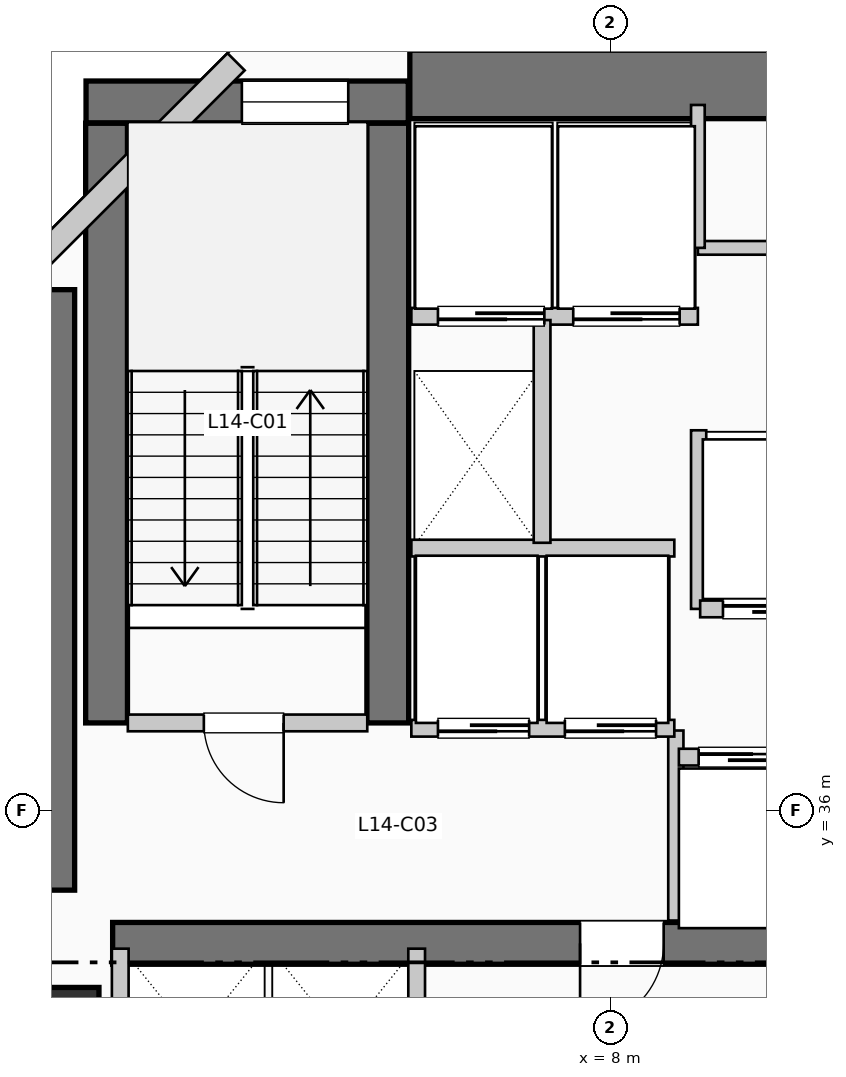
"""IFC4 building model, lengths in metres.
Left out: names, types, materials, properties, quantities, classifications, styles, units other than length and angle.
Written with IfcOpenShell. Run it as: python <this file> out.ifc"""

import sys

from ifc_helpers import new_model, si_unit, direction, frame, frame_2d, origin, origin_2d, place, context, subcontext, project, spatial, rectangle, extrude, element, fill, save


model = new_model("IFC4")
c1 = context("Model", 3, precision=1e-05, world=origin(), true_north=direction((0.0, 1.0)))
c2 = subcontext(c1, "Body", "Model", "MODEL_VIEW")
j1 = project(units=[si_unit("LENGTHUNIT", "METRE"), si_unit("PLANEANGLEUNIT", "RADIAN")], contexts=[c1])
p1 = place(None, origin())
s1 = spatial("IfcSite", under=j1, at=p1, CompositionType="ELEMENT")
p2 = place(p1, origin())
s2 = spatial("IfcBuilding", under=s1, at=p2, CompositionType="ELEMENT")
p3 = place(p2, frame((0.0, 0.0, 62.04)))
s3 = spatial("IfcBuildingStorey", under=s2, at=p3, CompositionType="ELEMENT", Elevation=62.04)
p4 = place(p3, frame((5.36, 45.55, 0.0), z_axis=(0.0, 0.0, 1.0), x_axis=(1.0, 0.0, 0.0)))
e1 = element("IfcWall", 1, at=p4, inside=s3, PredefinedType="SHEAR", context=c2, shape_type="SweptSolid", body=[
    extrude(rectangle(XDim=13.98, YDim=0.9, at=frame_2d((6.99, 0.0))), origin(), (0.0, 0.0, 1.0), 3.96),
])
p5 = place(p3, frame((0.5, 34.95, 0.0), z_axis=(0.0, 0.0, 1.0), x_axis=(0.0, 1.0, 0.0)))
e2 = element("IfcWall", 2, at=p5, inside=s3, PredefinedType="SHEAR", context=c2, shape_type="SweptSolid", body=[
    extrude(rectangle(XDim=7.9, YDim=0.9, at=frame_2d((3.95, 0.0))), origin(), (0.0, 0.0, 1.0), 3.96),
])
p6 = place(p3, frame((1.45, 34.25, 0.0), z_axis=(0.0, 0.0, 1.0), x_axis=(1.0, 0.0, 0.0)))
e3 = element("IfcWall", 3, at=p6, inside=s3, PredefinedType="SHEAR", context=c2, shape_type="SweptSolid", body=[
    extrude(rectangle(XDim=10.71, YDim=0.55, at=frame_2d((5.355, 0.0))), origin(), (0.0, 0.0, 1.0), 3.96),
])
p7 = place(p6, frame((7.25, 0.0, 0.0), z_axis=(0.0, 0.0, 1.0), x_axis=(-1.0, 0.0, 0.0)))
e4 = element("IfcOpeningElement", 4, at=p7, cuts=e3, PredefinedType="OPENING", context=c2, shape_type="SweptSolid", body=[
    extrude(rectangle(XDim=1.1, YDim=2.15, at=frame_2d((0.55, 1.075))), frame((0.0, 0.285, 0.0), z_axis=(0.0, -1.0, 0.0), x_axis=(1.0, 0.0, 0.0)), (0.0, 0.0, 1.0), 0.57),
])
for number, where, z_axis, x_axis in (
    (5, (1.37, 37.15, 0.0), (0.0, 0.0, 1.0), (0.0, 1.0, 0.0)),
    (6, (5.07, 37.15, 0.0), (0.0, 0.0, 1.0), (0.0, 1.0, 0.0)),
):
    element("IfcWall", number, at=place(p3, frame(where, z_axis=z_axis, x_axis=x_axis)), inside=s3, PredefinedType="SHEAR", context=c2, shape_type="SweptSolid", body=[
        extrude(rectangle(XDim=7.89, YDim=0.55, at=frame_2d((3.945, 0.0))), origin(), (0.0, 0.0, 1.0), 3.96),
    ])
p8 = place(p3, frame((1.1, 45.32, 0.0), z_axis=(0.0, 0.0, 1.0), x_axis=(1.0, 0.0, 0.0)))
e7 = element("IfcWall", 7, at=p8, inside=s3, PredefinedType="SHEAR", context=c2, shape_type="SweptSolid", body=[
    extrude(rectangle(XDim=4.24, YDim=0.55, at=frame_2d((2.12, 0.0))), origin(), (0.0, 0.0, 1.0), 3.96),
])
p9 = place(p8, frame((2.05, 0.0, 1.05)))
e8 = element("IfcOpeningElement", 8, at=p9, cuts=e7, PredefinedType="OPENING", context=c2, shape_type="SweptSolid", body=[
    extrude(rectangle(XDim=1.4, YDim=1.8, at=frame_2d((0.7, 0.9))), frame((0.0, 0.285, 0.0), z_axis=(0.0, -1.0, 0.0), x_axis=(1.0, 0.0, 0.0)), (0.0, 0.0, 1.0), 0.57),
])
p10 = place(p3, frame((0.8, 33.2, 0.0), z_axis=(0.0, 0.0, 1.0), x_axis=(1.0, 0.0, 0.0)))
e9 = element("IfcColumn", 9, at=p10, inside=s3, PredefinedType="COLUMN", context=c2, shape_type="SweptSolid", body=[
    extrude(rectangle(XDim=0.94, YDim=0.94, at=origin_2d()), origin(), (0.0, 0.0, 1.0), 3.96),
])
p11 = place(p3, frame((3.074, 45.848, 0.0), z_axis=(0.0, 0.0, 1.0), x_axis=(-0.707106781187, -0.707106781187, 0.0)))
e10 = element("IfcWall", 10, at=p11, inside=s3, PredefinedType="SOLIDWALL", context=c2, shape_type="SweptSolid", body=[
    extrude(rectangle(XDim=4.133, YDim=0.32, at=frame_2d((2.066, 0.0))), origin(), (0.0, 0.0, 1.0), 3.71),
])
p12 = place(p3, frame((1.65, 37.15, 0.0), z_axis=(0.0, 0.0, 1.0), x_axis=(1.0, 0.0, 0.0)))
e11 = element("IfcWall", 11, at=p12, inside=s3, PredefinedType="PARTITIONING", context=c2, shape_type="SweptSolid", body=[
    extrude(rectangle(XDim=3.15, YDim=0.22, at=frame_2d((1.575, 0.0))), origin(), (0.0, 0.0, 1.0), 3.71),
])
p13 = place(p12, frame((2.05, 0.0, 0.0), z_axis=(0.0, 0.0, 1.0), x_axis=(-1.0, 0.0, 0.0)))
e12 = element("IfcOpeningElement", 12, at=p13, cuts=e11, PredefinedType="OPENING", context=c2, shape_type="SweptSolid", body=[
    extrude(rectangle(XDim=1.05, YDim=2.15, at=frame_2d((0.525, 1.075))), frame((0.0, 0.12, 0.0), z_axis=(0.0, -1.0, 0.0), x_axis=(1.0, 0.0, 0.0)), (0.0, 0.0, 1.0), 0.24),
])
p14 = place(p3, frame((8.86, 34.55, 0.0), z_axis=(0.0, 0.0, 1.0), x_axis=(0.0, 1.0, 0.0)))
e13 = element("IfcWall", 13, at=p14, inside=s3, PredefinedType="PARTITIONING", context=c2, shape_type="SweptSolid", body=[
    extrude(rectangle(XDim=2.5, YDim=0.2, at=frame_2d((1.25, 0.0))), origin(), (0.0, 0.0, 1.0), 3.71),
])
p15 = place(p3, frame((5.38, 37.08, 0.0), z_axis=(0.0, 0.0, 1.0), x_axis=(1.0, 0.0, 0.0)))
e14 = element("IfcWall", 14, at=p15, inside=s3, PredefinedType="PARTITIONING", context=c2, shape_type="SweptSolid", body=[
    extrude(rectangle(XDim=3.46, YDim=0.22, at=frame_2d((1.73, 0.0))), origin(), (0.0, 0.0, 1.0), 3.71),
])
p16 = place(p15, frame((1.55, 0.0, 0.0), z_axis=(0.0, 0.0, 1.0), x_axis=(-1.0, 0.0, 0.0)))
e15 = element("IfcOpeningElement", 15, at=p16, cuts=e14, PredefinedType="OPENING", context=c2, shape_type="SweptSolid", body=[
    extrude(rectangle(XDim=1.2, YDim=2.2, at=frame_2d((0.6, 1.1))), frame((0.0, 0.12, 0.0), z_axis=(0.0, -1.0, 0.0), x_axis=(1.0, 0.0, 0.0)), (0.0, 0.0, 1.0), 0.24),
])
p17 = place(p15, frame((3.22, 0.0, 0.0), z_axis=(0.0, 0.0, 1.0), x_axis=(-1.0, 0.0, 0.0)))
e16 = element("IfcOpeningElement", 16, at=p17, cuts=e14, PredefinedType="OPENING", context=c2, shape_type="SweptSolid", body=[
    extrude(rectangle(XDim=1.2, YDim=2.2, at=frame_2d((0.6, 1.1))), frame((0.0, 0.12, 0.0), z_axis=(0.0, -1.0, 0.0), x_axis=(1.0, 0.0, 0.0)), (0.0, 0.0, 1.0), 0.24),
])
p18 = place(p3, frame((5.38, 39.45, 0.0), z_axis=(0.0, 0.0, 1.0), x_axis=(1.0, 0.0, 0.0)))
e17 = element("IfcWall", 17, at=p18, inside=s3, PredefinedType="PARTITIONING", context=c2, shape_type="SweptSolid", body=[
    extrude(rectangle(XDim=3.46, YDim=0.22, at=frame_2d((1.73, 0.0))), origin(), (0.0, 0.0, 1.0), 3.71),
])
p19 = place(p3, frame((5.38, 42.5, 0.0), z_axis=(0.0, 0.0, 1.0), x_axis=(1.0, 0.0, 0.0)))
e18 = element("IfcWall", 18, at=p19, inside=s3, PredefinedType="PARTITIONING", context=c2, shape_type="SweptSolid", body=[
    extrude(rectangle(XDim=3.77, YDim=0.22, at=frame_2d((1.885, 0.0))), origin(), (0.0, 0.0, 1.0), 3.71),
])
p20 = place(p19, frame((1.75, 0.0, 0.0), z_axis=(0.0, 0.0, 1.0), x_axis=(-1.0, 0.0, 0.0)))
e19 = element("IfcOpeningElement", 19, at=p20, cuts=e18, PredefinedType="OPENING", context=c2, shape_type="SweptSolid", body=[
    extrude(rectangle(XDim=1.4, YDim=2.2, at=frame_2d((0.7, 1.1))), frame((0.0, 0.12, 0.0), z_axis=(0.0, -1.0, 0.0), x_axis=(1.0, 0.0, 0.0)), (0.0, 0.0, 1.0), 0.24),
])
p21 = place(p19, frame((3.53, 0.0, 0.0), z_axis=(0.0, 0.0, 1.0), x_axis=(-1.0, 0.0, 0.0)))
e20 = element("IfcOpeningElement", 20, at=p21, cuts=e18, PredefinedType="OPENING", context=c2, shape_type="SweptSolid", body=[
    extrude(rectangle(XDim=1.4, YDim=2.2, at=frame_2d((0.7, 1.1))), frame((0.0, 0.12, 0.0), z_axis=(0.0, -1.0, 0.0), x_axis=(1.0, 0.0, 0.0)), (0.0, 0.0, 1.0), 0.24),
])
p22 = place(p3, frame((7.1, 39.52, 0.0), z_axis=(0.0, 0.0, 1.0), x_axis=(0.0, 1.0, 0.0)))
e21 = element("IfcWall", 21, at=p22, inside=s3, PredefinedType="PARTITIONING", context=c2, shape_type="SweptSolid", body=[
    extrude(rectangle(XDim=2.93, YDim=0.22, at=frame_2d((1.465, 0.0))), origin(), (0.0, 0.0, 1.0), 3.71),
])
for number, where, z_axis, x_axis in (
    (22, (1.55, 31.8, 0.0), (0.0, 0.0, 1.0), (0.0, 1.0, 0.0)),
    (23, (5.45, 31.8, 0.0), (0.0, 0.0, 1.0), (0.0, 1.0, 0.0)),
):
    element("IfcWall", number, at=place(p3, frame(where, z_axis=z_axis, x_axis=x_axis)), inside=s3, PredefinedType="PARTITIONING", context=c2, shape_type="SweptSolid", body=[
        extrude(rectangle(XDim=2.38, YDim=0.22, at=frame_2d((1.19, 0.0))), origin(), (0.0, 0.0, 1.0), 3.71),
    ])
p23 = place(p3, frame((9.16, 38.65, 0.0), z_axis=(0.0, 0.0, 1.0), x_axis=(0.0, 1.0, 0.0)))
e24 = element("IfcWall", 24, at=p23, inside=s3, PredefinedType="PARTITIONING", context=c2, shape_type="SweptSolid", body=[
    extrude(rectangle(XDim=2.35, YDim=0.2, at=frame_2d((1.175, 0.0))), origin(), (0.0, 0.0, 1.0), 3.71),
])
p24 = place(p3, frame((8.9, 36.7, 0.0), z_axis=(0.0, 0.0, 1.0), x_axis=(1.0, 0.0, 0.0)))
e25 = element("IfcWall", 25, at=p24, inside=s3, PredefinedType="PARTITIONING", context=c2, shape_type="SweptSolid", body=[
    extrude(rectangle(XDim=3.26, YDim=0.22, at=frame_2d((1.63, 0.0))), origin(), (0.0, 0.0, 1.0), 3.71),
])
p25 = place(p24, frame((0.26, 0.0, 0.0)))
e26 = element("IfcOpeningElement", 26, at=p25, cuts=e25, PredefinedType="OPENING", context=c2, shape_type="SweptSolid", body=[
    extrude(rectangle(XDim=1.1, YDim=2.2, at=frame_2d((0.55, 1.1))), frame((0.0, 0.12, 0.0), z_axis=(0.0, -1.0, 0.0), x_axis=(1.0, 0.0, 0.0)), (0.0, 0.0, 1.0), 0.24),
])
p26 = place(p24, frame((1.88, 0.0, 0.0)))
e27 = element("IfcOpeningElement", 27, at=p26, cuts=e25, PredefinedType="OPENING", context=c2, shape_type="SweptSolid", body=[
    extrude(rectangle(XDim=1.1, YDim=2.2, at=frame_2d((0.55, 1.1))), frame((0.0, 0.12, 0.0), z_axis=(0.0, -1.0, 0.0), x_axis=(1.0, 0.0, 0.0)), (0.0, 0.0, 1.0), 0.24),
])
p27 = place(p3, frame((9.18, 38.65, 0.0), z_axis=(0.0, 0.0, 1.0), x_axis=(1.0, 0.0, 0.0)))
e28 = element("IfcWall", 28, at=p27, inside=s3, PredefinedType="PARTITIONING", context=c2, shape_type="SweptSolid", body=[
    extrude(rectangle(XDim=3.38, YDim=0.22, at=frame_2d((1.69, 0.0))), origin(), (0.0, 0.0, 1.0), 3.71),
])
p28 = place(p27, frame((0.3, 0.0, 0.0)))
e29 = element("IfcOpeningElement", 29, at=p28, cuts=e28, PredefinedType="OPENING", context=c2, shape_type="SweptSolid", body=[
    extrude(rectangle(XDim=1.1, YDim=2.2, at=frame_2d((0.55, 1.1))), frame((0.0, 0.12, 0.0), z_axis=(0.0, -1.0, 0.0), x_axis=(1.0, 0.0, 0.0)), (0.0, 0.0, 1.0), 0.24),
])
p29 = place(p27, frame((1.95, 0.0, 0.0)))
e30 = element("IfcOpeningElement", 30, at=p29, cuts=e28, PredefinedType="OPENING", context=c2, shape_type="SweptSolid", body=[
    extrude(rectangle(XDim=1.1, YDim=2.2, at=frame_2d((0.55, 1.1))), frame((0.0, 0.12, 0.0), z_axis=(0.0, -1.0, 0.0), x_axis=(1.0, 0.0, 0.0)), (0.0, 0.0, 1.0), 0.24),
])
p30 = place(p3, frame((9.15, 43.4, 0.0), z_axis=(0.0, 0.0, 1.0), x_axis=(1.0, 0.0, 0.0)))
e31 = element("IfcWall", 31, at=p30, inside=s3, PredefinedType="PLUMBINGWALL", context=c2, shape_type="SweptSolid", body=[
    extrude(rectangle(XDim=9.33, YDim=0.18, at=frame_2d((4.665, 0.0))), origin(), (0.0, 0.0, 1.0), 3.71),
])
p31 = place(p30, frame((1.88, 0.0, 0.0)))
e32 = element("IfcOpeningElement", 32, at=p31, cuts=e31, PredefinedType="OPENING", context=c2, shape_type="SweptSolid", body=[
    extrude(rectangle(XDim=0.92, YDim=2.1, at=frame_2d((0.46, 1.05))), frame((0.0, 0.1, 0.0), z_axis=(0.0, -1.0, 0.0), x_axis=(1.0, 0.0, 0.0)), (0.0, 0.0, 1.0), 0.2),
])
p32 = place(p30, frame((6.515, 0.0, 0.0)))
e33 = element("IfcOpeningElement", 33, at=p32, cuts=e31, PredefinedType="OPENING", context=c2, shape_type="SweptSolid", body=[
    extrude(rectangle(XDim=0.92, YDim=2.1, at=frame_2d((0.46, 1.05))), frame((0.0, 0.1, 0.0), z_axis=(0.0, -1.0, 0.0), x_axis=(1.0, 0.0, 0.0)), (0.0, 0.0, 1.0), 0.2),
])
p33 = place(p3, frame((9.15, 43.4, 0.0), z_axis=(0.0, 0.0, 1.0), x_axis=(0.0, 1.0, 0.0)))
e34 = element("IfcWall", 34, at=p33, inside=s3, PredefinedType="PLUMBINGWALL", context=c2, shape_type="SweptSolid", body=[
    extrude(rectangle(XDim=1.88, YDim=0.18, at=frame_2d((0.94, 0.0))), origin(), (0.0, 0.0, 1.0), 3.71),
])
p34 = place(p9, origin())
e35 = element("IfcWindow", 35, at=p34, inside=s3, PartitioningType="SINGLE_PANEL", PredefinedType="WINDOW", context=c2, shape_type="SweptSolid", body=[
    extrude(rectangle(XDim=1.4, YDim=1.8, at=frame_2d((0.7, 0.9))), frame((0.0, 0.03, 0.0), z_axis=(0.0, -1.0, 0.0), x_axis=(1.0, 0.0, 0.0)), (0.0, 0.0, 1.0), 0.06),
])
fill(e8, e35)
p35 = place(p13, origin())
e36 = element("IfcDoor", 36, at=p35, inside=s3, OperationType="SINGLE_SWING_RIGHT", PredefinedType="DOOR", context=c2, shape_type="SweptSolid", body=[
    extrude(rectangle(XDim=1.05, YDim=2.15, at=frame_2d((0.525, 1.075))), frame((0.0, 0.025, 0.0), z_axis=(0.0, -1.0, 0.0), x_axis=(1.0, 0.0, 0.0)), (0.0, 0.0, 1.0), 0.05),
])
fill(e12, e36)
p36 = place(p7, origin())
e37 = element("IfcDoor", 37, at=p36, inside=s3, OperationType="SINGLE_SWING_LEFT", PredefinedType="DOOR", context=c2, shape_type="SweptSolid", body=[
    extrude(rectangle(XDim=1.1, YDim=2.15, at=frame_2d((0.55, 1.075))), frame((0.0, 0.025, 0.0), z_axis=(0.0, -1.0, 0.0), x_axis=(1.0, 0.0, 0.0)), (0.0, 0.0, 1.0), 0.05),
])
fill(e4, e37)
p37 = place(p16, origin())
e38 = element("IfcDoor", 38, at=p37, inside=s3, OperationType="SLIDING_TO_RIGHT", PredefinedType="DOOR", context=c2, shape_type="SweptSolid", body=[
    extrude(rectangle(XDim=1.2, YDim=2.2, at=frame_2d((0.6, 1.1))), frame((0.0, 0.025, 0.0), z_axis=(0.0, -1.0, 0.0), x_axis=(1.0, 0.0, 0.0)), (0.0, 0.0, 1.0), 0.05),
])
fill(e15, e38)
p38 = place(p17, origin())
e39 = element("IfcDoor", 39, at=p38, inside=s3, OperationType="SLIDING_TO_RIGHT", PredefinedType="DOOR", context=c2, shape_type="SweptSolid", body=[
    extrude(rectangle(XDim=1.2, YDim=2.2, at=frame_2d((0.6, 1.1))), frame((0.0, 0.025, 0.0), z_axis=(0.0, -1.0, 0.0), x_axis=(1.0, 0.0, 0.0)), (0.0, 0.0, 1.0), 0.05),
])
fill(e16, e39)
p39 = place(p20, origin())
e40 = element("IfcDoor", 40, at=p39, inside=s3, OperationType="SLIDING_TO_LEFT", PredefinedType="DOOR", context=c2, shape_type="SweptSolid", body=[
    extrude(rectangle(XDim=1.4, YDim=2.2, at=frame_2d((0.7, 1.1))), frame((0.0, 0.025, 0.0), z_axis=(0.0, -1.0, 0.0), x_axis=(1.0, 0.0, 0.0)), (0.0, 0.0, 1.0), 0.05),
])
fill(e19, e40)
p40 = place(p21, origin())
e41 = element("IfcDoor", 41, at=p40, inside=s3, OperationType="SLIDING_TO_LEFT", PredefinedType="DOOR", context=c2, shape_type="SweptSolid", body=[
    extrude(rectangle(XDim=1.4, YDim=2.2, at=frame_2d((0.7, 1.1))), frame((0.0, 0.025, 0.0), z_axis=(0.0, -1.0, 0.0), x_axis=(1.0, 0.0, 0.0)), (0.0, 0.0, 1.0), 0.05),
])
fill(e20, e41)
p41 = place(p25, origin())
e42 = element("IfcDoor", 42, at=p41, inside=s3, OperationType="SLIDING_TO_LEFT", PredefinedType="DOOR", context=c2, shape_type="SweptSolid", body=[
    extrude(rectangle(XDim=1.1, YDim=2.2, at=frame_2d((0.55, 1.1))), frame((0.0, 0.025, 0.0), z_axis=(0.0, -1.0, 0.0), x_axis=(1.0, 0.0, 0.0)), (0.0, 0.0, 1.0), 0.05),
])
fill(e26, e42)
p42 = place(p28, origin())
e43 = element("IfcDoor", 43, at=p42, inside=s3, OperationType="SLIDING_TO_LEFT", PredefinedType="DOOR", context=c2, shape_type="SweptSolid", body=[
    extrude(rectangle(XDim=1.1, YDim=2.2, at=frame_2d((0.55, 1.1))), frame((0.0, 0.025, 0.0), z_axis=(0.0, -1.0, 0.0), x_axis=(1.0, 0.0, 0.0)), (0.0, 0.0, 1.0), 0.05),
])
fill(e29, e43)
save(model, sys.argv[1])
